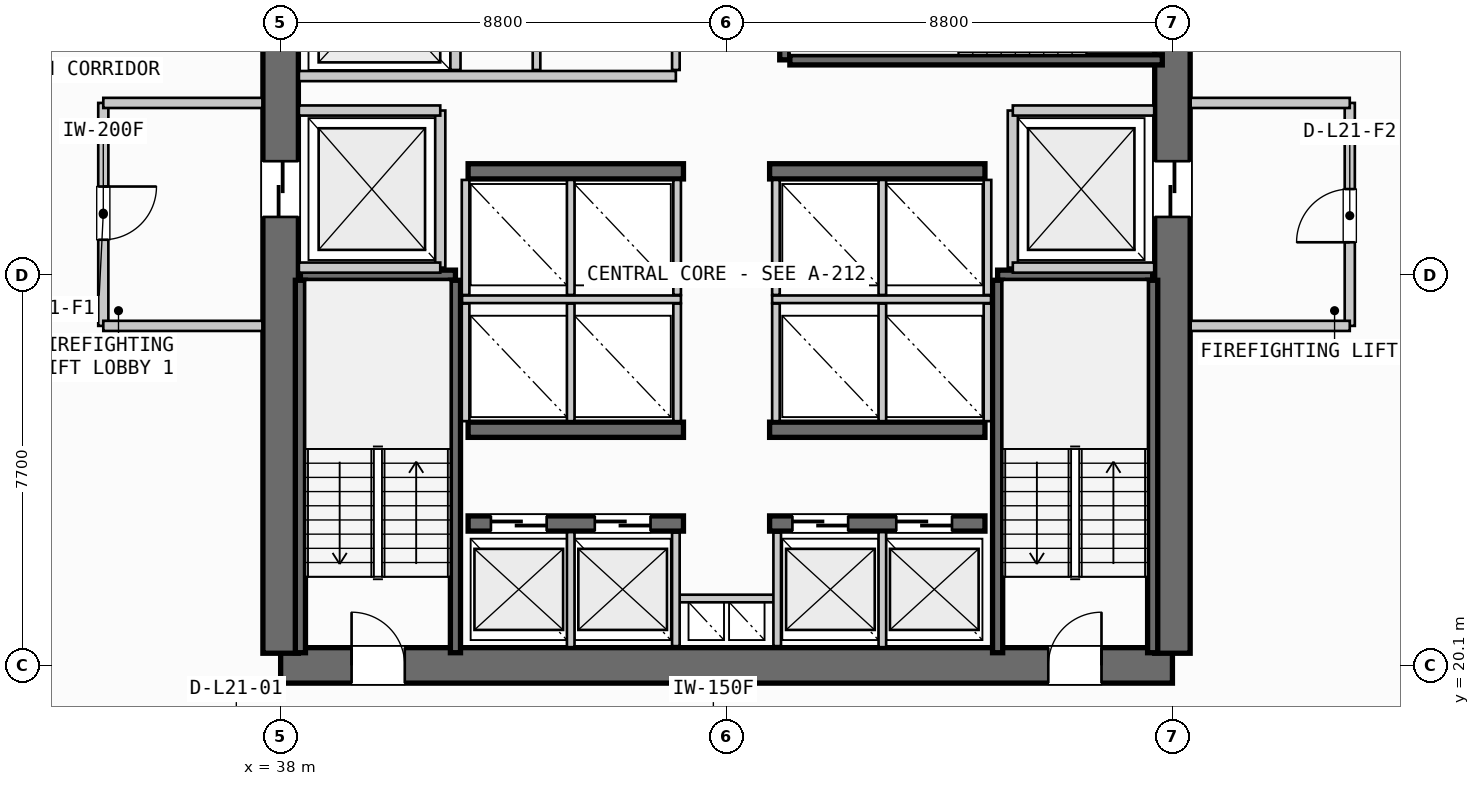
"""IFC4 building model, lengths in metres.
Left out: names, types, materials, properties, quantities, classifications, styles, units other than length and angle.
Written with IfcOpenShell. Run it as: python <this file> out.ifc"""

import sys

from ifc_helpers import new_model, si_unit, direction, frame, frame_2d, origin, place, context, subcontext, project, spatial, rectangle, extrude, source, transform, mapped, element, fill, save


model = new_model("IFC4")
c1 = context("Model", 3, precision=1e-05, world=origin(), true_north=direction((0.0, 1.0)))
c2 = subcontext(c1, "Body", "Model", "MODEL_VIEW")
j1 = project(units=[si_unit("LENGTHUNIT", "METRE"), si_unit("PLANEANGLEUNIT", "RADIAN")], contexts=[c1])
p1 = place(None, origin())
s1 = spatial("IfcSite", under=j1, at=p1, CompositionType="ELEMENT")
p2 = place(p1, origin())
s2 = spatial("IfcBuilding", under=s1, at=p2, CompositionType="ELEMENT")
p3 = place(p2, frame((0.0, 0.0, 89.2)))
s3 = spatial("IfcBuildingStorey", under=s2, at=p3, CompositionType="ELEMENT", Elevation=89.2)
p4 = place(p3, frame((38.0, 20.1, 0.0), z_axis=(0.0, 0.0, 1.0), x_axis=(1.0, 0.0, 0.0)))
e1 = element("IfcWall", 1, at=p4, inside=s3, PredefinedType="SHEAR", context=c2, shape_type="SweptSolid", body=[
    extrude(rectangle(XDim=17.6, YDim=0.7, at=frame_2d((8.8, 0.0))), origin(), (0.0, 0.0, 1.0), 3.35),
])
p5 = place(p4, frame((1.4, 0.0, 0.0)))
e2 = element("IfcOpeningElement", 2, at=p5, cuts=e1, PredefinedType="OPENING", context=c2, shape_type="SweptSolid", body=[
    extrude(rectangle(XDim=1.05, YDim=2.15, at=frame_2d((0.525, 1.075))), frame((0.0, 0.36, 0.0), z_axis=(0.0, -1.0, 0.0), x_axis=(1.0, 0.0, 0.0)), (0.0, 0.0, 1.0), 0.72),
])
p6 = place(p4, frame((15.15, 0.0, 0.0)))
e3 = element("IfcOpeningElement", 3, at=p6, cuts=e1, PredefinedType="OPENING", context=c2, shape_type="SweptSolid", body=[
    extrude(rectangle(XDim=1.05, YDim=2.15, at=frame_2d((0.525, 1.075))), frame((0.0, 0.36, 0.0), z_axis=(0.0, -1.0, 0.0), x_axis=(1.0, 0.0, 0.0)), (0.0, 0.0, 1.0), 0.72),
])
p7 = place(p3, frame((38.0, 35.26, 0.0), z_axis=(0.0, 0.0, 1.0), x_axis=(0.0, -1.0, 0.0)))
e4 = element("IfcWall", 4, at=p7, inside=s3, PredefinedType="SHEAR", context=c2, shape_type="SweptSolid", body=[
    extrude(rectangle(XDim=14.92, YDim=0.7, at=frame_2d((7.46, 0.0))), origin(), (0.0, 0.0, 1.0), 3.35),
])
p8 = place(p7, frame((5.21, 0.0, 0.0)))
e5 = element("IfcOpeningElement", 5, at=p8, cuts=e4, PredefinedType="OPENING", context=c2, shape_type="SweptSolid", body=[
    extrude(rectangle(XDim=1.1, YDim=2.2, at=frame_2d((0.55, 1.1))), frame((0.0, 0.36, 0.0), z_axis=(0.0, -1.0, 0.0), x_axis=(1.0, 0.0, 0.0)), (0.0, 0.0, 1.0), 0.72),
])
p9 = place(p3, frame((55.6, 20.34, 0.0), z_axis=(0.0, 0.0, 1.0), x_axis=(0.0, 1.0, 0.0)))
e6 = element("IfcWall", 6, at=p9, inside=s3, PredefinedType="SHEAR", context=c2, shape_type="SweptSolid", body=[
    extrude(rectangle(XDim=14.92, YDim=0.7, at=frame_2d((7.46, 0.0))), origin(), (0.0, 0.0, 1.0), 3.35),
])
p10 = place(p9, frame((12.71, 0.0, 0.0)))
e7 = element("IfcOpeningElement", 7, at=p10, cuts=e6, PredefinedType="OPENING", context=c2, shape_type="SweptSolid", body=[
    extrude(rectangle(XDim=1.05, YDim=2.15, at=frame_2d((0.525, 1.075))), frame((0.0, 0.36, 0.0), z_axis=(0.0, -1.0, 0.0), x_axis=(1.0, 0.0, 0.0)), (0.0, 0.0, 1.0), 0.72),
])
p11 = place(p9, frame((8.61, 0.0, 0.0)))
e8 = element("IfcOpeningElement", 8, at=p11, cuts=e6, PredefinedType="OPENING", context=c2, shape_type="SweptSolid", body=[
    extrude(rectangle(XDim=1.1, YDim=2.2, at=frame_2d((0.55, 1.1))), frame((0.0, 0.36, 0.0), z_axis=(0.0, -1.0, 0.0), x_axis=(1.0, 0.0, 0.0)), (0.0, 0.0, 1.0), 0.72),
])
p12 = place(p3, frame((41.7, 22.9, 0.0), z_axis=(0.0, 0.0, 1.0), x_axis=(1.0, 0.0, 0.0)))
e9 = element("IfcWall", 9, at=p12, inside=s3, PredefinedType="SHEAR", context=c2, shape_type="SweptSolid", body=[
    extrude(rectangle(XDim=4.25, YDim=0.3, at=frame_2d((2.125, 0.0))), origin(), (0.0, 0.0, 1.0), 3.35),
])
p13 = place(p12, frame((0.45, 0.0, 0.0)))
e10 = element("IfcOpeningElement", 10, at=p13, cuts=e9, PredefinedType="OPENING", context=c2, shape_type="SweptSolid", body=[
    extrude(rectangle(XDim=1.1, YDim=2.2, at=frame_2d((0.55, 1.1))), frame((0.0, 0.16, 0.0), z_axis=(0.0, -1.0, 0.0), x_axis=(1.0, 0.0, 0.0)), (0.0, 0.0, 1.0), 0.32),
])
p14 = place(p12, frame((2.5, 0.0, 0.0)))
e11 = element("IfcOpeningElement", 11, at=p14, cuts=e9, PredefinedType="OPENING", context=c2, shape_type="SweptSolid", body=[
    extrude(rectangle(XDim=1.1, YDim=2.2, at=frame_2d((0.55, 1.1))), frame((0.0, 0.16, 0.0), z_axis=(0.0, -1.0, 0.0), x_axis=(1.0, 0.0, 0.0)), (0.0, 0.0, 1.0), 0.32),
])
p15 = place(p3, frame((47.65, 22.9, 0.0), z_axis=(0.0, 0.0, 1.0), x_axis=(1.0, 0.0, 0.0)))
e12 = element("IfcWall", 12, at=p15, inside=s3, PredefinedType="SHEAR", context=c2, shape_type="SweptSolid", body=[
    extrude(rectangle(XDim=4.25, YDim=0.3, at=frame_2d((2.125, 0.0))), origin(), (0.0, 0.0, 1.0), 3.35),
])
p16 = place(p15, frame((0.45, 0.0, 0.0)))
e13 = element("IfcOpeningElement", 13, at=p16, cuts=e12, PredefinedType="OPENING", context=c2, shape_type="SweptSolid", body=[
    extrude(rectangle(XDim=1.1, YDim=2.2, at=frame_2d((0.55, 1.1))), frame((0.0, 0.16, 0.0), z_axis=(0.0, -1.0, 0.0), x_axis=(1.0, 0.0, 0.0)), (0.0, 0.0, 1.0), 0.32),
])
p17 = place(p15, frame((2.5, 0.0, 0.0)))
e14 = element("IfcOpeningElement", 14, at=p17, cuts=e12, PredefinedType="OPENING", context=c2, shape_type="SweptSolid", body=[
    extrude(rectangle(XDim=1.1, YDim=2.2, at=frame_2d((0.55, 1.1))), frame((0.0, 0.16, 0.0), z_axis=(0.0, -1.0, 0.0), x_axis=(1.0, 0.0, 0.0)), (0.0, 0.0, 1.0), 0.32),
])
for number, where, z_axis, x_axis in (
    (15, (41.7, 24.75, 0.0), (0.0, 0.0, 1.0), (1.0, 0.0, 0.0)),
    (16, (47.65, 24.75, 0.0), (0.0, 0.0, 1.0), (1.0, 0.0, 0.0)),
    (17, (41.7, 29.85, 0.0), (0.0, 0.0, 1.0), (1.0, 0.0, 0.0)),
    (18, (47.65, 29.85, 0.0), (0.0, 0.0, 1.0), (1.0, 0.0, 0.0)),
):
    element("IfcWall", number, at=place(p3, frame(where, z_axis=z_axis, x_axis=x_axis)), inside=s3, PredefinedType="SHEAR", context=c2, shape_type="SweptSolid", body=[
        extrude(rectangle(XDim=4.25, YDim=0.3, at=frame_2d((2.125, 0.0))), origin(), (0.0, 0.0, 1.0), 3.35),
    ])
p18 = place(p3, frame((38.39, 27.8, 0.0), z_axis=(0.0, 0.0, 1.0), x_axis=(1.0, 0.0, 0.0)))
e19 = element("IfcWall", 19, at=p18, inside=s3, PredefinedType="SHEAR", context=c2, shape_type="SweptSolid", body=[
    extrude(rectangle(XDim=3.06, YDim=0.2, at=frame_2d((1.53, 0.0))), origin(), (0.0, 0.0, 1.0), 3.35),
])
for number, where, z_axis, x_axis in (
    (20, (41.45, 27.7, 0.0), (0.0, 0.0, 1.0), (0.0, -1.0, 0.0)),
    (21, (38.39, 20.35, 0.0), (0.0, 0.0, 1.0), (0.0, 1.0, 0.0)),
):
    element("IfcWall", number, at=place(p3, frame(where, z_axis=z_axis, x_axis=x_axis)), inside=s3, PredefinedType="SHEAR", context=c2, shape_type="SweptSolid", body=[
        extrude(rectangle(XDim=7.35, YDim=0.2, at=frame_2d((3.675, 0.0))), origin(), (0.0, 0.0, 1.0), 3.35),
    ])
p19 = place(p3, frame((52.15, 27.8, 0.0), z_axis=(0.0, 0.0, 1.0), x_axis=(1.0, 0.0, 0.0)))
e22 = element("IfcWall", 22, at=p19, inside=s3, PredefinedType="SHEAR", context=c2, shape_type="SweptSolid", body=[
    extrude(rectangle(XDim=3.06, YDim=0.2, at=frame_2d((1.53, 0.0))), origin(), (0.0, 0.0, 1.0), 3.35),
])
for number, where, z_axis, x_axis in (
    (23, (55.21, 27.7, 0.0), (0.0, 0.0, 1.0), (0.0, -1.0, 0.0)),
    (24, (52.15, 20.35, 0.0), (0.0, 0.0, 1.0), (0.0, 1.0, 0.0)),
):
    element("IfcWall", number, at=place(p3, frame(where, z_axis=z_axis, x_axis=x_axis)), inside=s3, PredefinedType="SHEAR", context=c2, shape_type="SweptSolid", body=[
        extrude(rectangle(XDim=7.35, YDim=0.2, at=frame_2d((3.675, 0.0))), origin(), (0.0, 0.0, 1.0), 3.35),
    ])
p20 = place(p3, frame((47.95, 32.05, 0.0), z_axis=(0.0, 0.0, 1.0), x_axis=(0.0, 1.0, 0.0)))
e25 = element("IfcWall", 25, at=p20, inside=s3, PredefinedType="SHEAR", context=c2, shape_type="SweptSolid", body=[
    extrude(rectangle(XDim=3.06, YDim=0.2, at=frame_2d((1.53, 0.0))), origin(), (0.0, 0.0, 1.0), 3.35),
])
p21 = place(p3, frame((55.4, 32.05, 0.0), z_axis=(0.0, 0.0, 1.0), x_axis=(-1.0, 0.0, 0.0)))
e26 = element("IfcWall", 26, at=p21, inside=s3, PredefinedType="SHEAR", context=c2, shape_type="SweptSolid", body=[
    extrude(rectangle(XDim=7.35, YDim=0.2, at=frame_2d((3.675, 0.0))), origin(), (0.0, 0.0, 1.0), 3.35),
])
p22 = place(p3, frame((45.8, 21.42, 0.0), z_axis=(0.0, 0.0, 1.0), x_axis=(1.0, 0.0, 0.0)))
e27 = element("IfcWall", 27, at=p22, inside=s3, PredefinedType="PARTITIONING", context=c2, shape_type="SweptSolid", body=[
    extrude(rectangle(XDim=2.0, YDim=0.15, at=frame_2d((1.0, 0.0))), origin(), (0.0, 0.0, 1.0), 2.28),
])
for number, where, z_axis, x_axis in (
    (28, (45.8, 20.48, 0.0), (0.0, 0.0, 1.0), (0.0, 1.0, 0.0)),
    (29, (47.8, 20.48, 0.0), (0.0, 0.0, 1.0), (0.0, 1.0, 0.0)),
):
    element("IfcWall", number, at=place(p3, frame(where, z_axis=z_axis, x_axis=x_axis)), inside=s3, PredefinedType="PARTITIONING", context=c2, shape_type="SweptSolid", body=[
        extrude(rectangle(XDim=2.24, YDim=0.15, at=frame_2d((1.12, 0.0))), origin(), (0.0, 0.0, 1.0), 2.28),
    ])
p23 = place(p3, frame((41.15, 27.95, 0.0), z_axis=(0.0, 0.0, 1.0), x_axis=(0.0, 1.0, 0.0)))
e30 = element("IfcWall", 30, at=p23, inside=s3, PredefinedType="PARTITIONING", context=c2, shape_type="SweptSolid", body=[
    extrude(rectangle(XDim=3.1, YDim=0.2, at=frame_2d((1.55, 0.0))), origin(), (0.0, 0.0, 1.0), 2.28),
])
for number, where, z_axis, x_axis in (
    (31, (38.36, 27.95, 0.0), (0.0, 0.0, 1.0), (1.0, 0.0, 0.0)),
    (32, (38.36, 31.05, 0.0), (0.0, 0.0, 1.0), (1.0, 0.0, 0.0)),
):
    element("IfcWall", number, at=place(p3, frame(where, z_axis=z_axis, x_axis=x_axis)), inside=s3, PredefinedType="PARTITIONING", context=c2, shape_type="SweptSolid", body=[
        extrude(rectangle(XDim=2.79, YDim=0.2, at=frame_2d((1.395, 0.0))), origin(), (0.0, 0.0, 1.0), 2.28),
    ])
p24 = place(p3, frame((34.5, 31.2, 0.0), z_axis=(0.0, 0.0, 1.0), x_axis=(0.0, -1.0, 0.0)))
e33 = element("IfcWall", 33, at=p24, inside=s3, PredefinedType="PARTITIONING", context=c2, shape_type="SweptSolid", body=[
    extrude(rectangle(XDim=4.4, YDim=0.2, at=frame_2d((2.2, 0.0))), origin(), (0.0, 0.0, 1.0), 2.28),
])
p25 = place(p24, frame((1.65, 0.0, 0.0)))
e34 = element("IfcOpeningElement", 34, at=p25, cuts=e33, PredefinedType="OPENING", context=c2, shape_type="SweptSolid", body=[
    extrude(rectangle(XDim=1.05, YDim=2.15, at=frame_2d((0.525, 1.075))), frame((0.0, 0.11, 0.0), z_axis=(0.0, -1.0, 0.0), x_axis=(1.0, 0.0, 0.0)), (0.0, 0.0, 1.0), 0.22),
])
for number, where, z_axis, x_axis in (
    (35, (34.5, 26.8, 0.0), (0.0, 0.0, 1.0), (1.0, 0.0, 0.0)),
    (36, (34.5, 31.2, 0.0), (0.0, 0.0, 1.0), (1.0, 0.0, 0.0)),
):
    element("IfcWall", number, at=place(p3, frame(where, z_axis=z_axis, x_axis=x_axis)), inside=s3, PredefinedType="PARTITIONING", context=c2, shape_type="SweptSolid", body=[
        extrude(rectangle(XDim=3.14, YDim=0.2, at=frame_2d((1.57, 0.0))), origin(), (0.0, 0.0, 1.0), 2.28),
    ])
p26 = place(p3, frame((52.45, 27.95, 0.0), z_axis=(0.0, 0.0, 1.0), x_axis=(0.0, 1.0, 0.0)))
e37 = element("IfcWall", 37, at=p26, inside=s3, PredefinedType="PARTITIONING", context=c2, shape_type="SweptSolid", body=[
    extrude(rectangle(XDim=3.1, YDim=0.2, at=frame_2d((1.55, 0.0))), origin(), (0.0, 0.0, 1.0), 2.28),
])
for number, where, z_axis, x_axis in (
    (38, (52.45, 27.95, 0.0), (0.0, 0.0, 1.0), (1.0, 0.0, 0.0)),
    (39, (52.45, 31.05, 0.0), (0.0, 0.0, 1.0), (1.0, 0.0, 0.0)),
):
    element("IfcWall", number, at=place(p3, frame(where, z_axis=z_axis, x_axis=x_axis)), inside=s3, PredefinedType="PARTITIONING", context=c2, shape_type="SweptSolid", body=[
        extrude(rectangle(XDim=2.79, YDim=0.2, at=frame_2d((1.395, 0.0))), origin(), (0.0, 0.0, 1.0), 2.28),
    ])
p27 = place(p3, frame((59.1, 26.8, 0.0), z_axis=(0.0, 0.0, 1.0), x_axis=(0.0, 1.0, 0.0)))
e40 = element("IfcWall", 40, at=p27, inside=s3, PredefinedType="PARTITIONING", context=c2, shape_type="SweptSolid", body=[
    extrude(rectangle(XDim=4.4, YDim=0.2, at=frame_2d((2.2, 0.0))), origin(), (0.0, 0.0, 1.0), 2.28),
])
p28 = place(p27, frame((1.65, 0.0, 0.0)))
e41 = element("IfcOpeningElement", 41, at=p28, cuts=e40, PredefinedType="OPENING", context=c2, shape_type="SweptSolid", body=[
    extrude(rectangle(XDim=1.05, YDim=2.15, at=frame_2d((0.525, 1.075))), frame((0.0, 0.11, 0.0), z_axis=(0.0, -1.0, 0.0), x_axis=(1.0, 0.0, 0.0)), (0.0, 0.0, 1.0), 0.22),
])
for number, where, z_axis, x_axis in (
    (42, (55.96, 26.8, 0.0), (0.0, 0.0, 1.0), (1.0, 0.0, 0.0)),
    (43, (55.96, 31.2, 0.0), (0.0, 0.0, 1.0), (1.0, 0.0, 0.0)),
):
    element("IfcWall", number, at=place(p3, frame(where, z_axis=z_axis, x_axis=x_axis)), inside=s3, PredefinedType="PARTITIONING", context=c2, shape_type="SweptSolid", body=[
        extrude(rectangle(XDim=3.14, YDim=0.2, at=frame_2d((1.57, 0.0))), origin(), (0.0, 0.0, 1.0), 2.28),
    ])
for number, where, z_axis, x_axis in (
    (44, (43.725, 20.46, 0.0), (0.0, 0.0, 1.0), (0.0, 1.0, 0.0)),
    (45, (49.875, 20.46, 0.0), (0.0, 0.0, 1.0), (0.0, 1.0, 0.0)),
):
    element("IfcWall", number, at=place(p3, frame(where, z_axis=z_axis, x_axis=x_axis)), inside=s3, PredefinedType="PARTITIONING", context=c2, shape_type="SweptSolid", body=[
        extrude(rectangle(XDim=2.27, YDim=0.15, at=frame_2d((1.135, 0.0))), origin(), (0.0, 0.0, 1.0), 2.28),
    ])
p29 = place(p3, frame((41.58, 27.325, 0.0), z_axis=(0.0, 0.0, 1.0), x_axis=(1.0, 0.0, 0.0)))
e46 = element("IfcWall", 46, at=p29, inside=s3, PredefinedType="PARTITIONING", context=c2, shape_type="SweptSolid", body=[
    extrude(rectangle(XDim=4.32, YDim=0.15, at=frame_2d((2.16, 0.0))), origin(), (0.0, 0.0, 1.0), 2.28),
])
p30 = place(p3, frame((47.7, 27.325, 0.0), z_axis=(0.0, 0.0, 1.0), x_axis=(1.0, 0.0, 0.0)))
e47 = element("IfcWall", 47, at=p30, inside=s3, PredefinedType="PARTITIONING", context=c2, shape_type="SweptSolid", body=[
    extrude(rectangle(XDim=4.32, YDim=0.15, at=frame_2d((2.16, 0.0))), origin(), (0.0, 0.0, 1.0), 2.28),
])
for number, where, z_axis, x_axis in (
    (48, (41.65, 24.92, 0.0), (0.0, 0.0, 1.0), (0.0, 1.0, 0.0)),
    (49, (43.725, 24.92, 0.0), (0.0, 0.0, 1.0), (0.0, 1.0, 0.0)),
    (50, (45.825, 24.92, 0.0), (0.0, 0.0, 1.0), (0.0, 1.0, 0.0)),
    (51, (47.775, 24.92, 0.0), (0.0, 0.0, 1.0), (0.0, 1.0, 0.0)),
    (52, (49.875, 24.92, 0.0), (0.0, 0.0, 1.0), (0.0, 1.0, 0.0)),
    (53, (51.95, 24.92, 0.0), (0.0, 0.0, 1.0), (0.0, 1.0, 0.0)),
):
    element("IfcWall", number, at=place(p3, frame(where, z_axis=z_axis, x_axis=x_axis)), inside=s3, PredefinedType="PARTITIONING", context=c2, shape_type="SweptSolid", body=[
        extrude(rectangle(XDim=2.32, YDim=0.15, at=frame_2d((1.16, 0.0))), origin(), (0.0, 0.0, 1.0), 2.28),
    ])
for number, where, z_axis, x_axis in (
    (54, (41.65, 27.41, 0.0), (0.0, 0.0, 1.0), (0.0, 1.0, 0.0)),
    (55, (43.725, 27.41, 0.0), (0.0, 0.0, 1.0), (0.0, 1.0, 0.0)),
    (56, (45.825, 27.41, 0.0), (0.0, 0.0, 1.0), (0.0, 1.0, 0.0)),
    (57, (47.775, 27.41, 0.0), (0.0, 0.0, 1.0), (0.0, 1.0, 0.0)),
    (58, (49.875, 27.41, 0.0), (0.0, 0.0, 1.0), (0.0, 1.0, 0.0)),
    (59, (51.95, 27.41, 0.0), (0.0, 0.0, 1.0), (0.0, 1.0, 0.0)),
):
    element("IfcWall", number, at=place(p3, frame(where, z_axis=z_axis, x_axis=x_axis)), inside=s3, PredefinedType="PARTITIONING", context=c2, shape_type="SweptSolid", body=[
        extrude(rectangle(XDim=2.27, YDim=0.15, at=frame_2d((1.135, 0.0))), origin(), (0.0, 0.0, 1.0), 2.28),
    ])
p31 = place(p3, frame((41.45, 31.85, 0.0), z_axis=(0.0, 0.0, 1.0), x_axis=(0.0, 1.0, 0.0)))
e60 = element("IfcWall", 60, at=p31, inside=s3, PredefinedType="PARTITIONING", context=c2, shape_type="SweptSolid", body=[
    extrude(rectangle(XDim=3.29, YDim=0.2, at=frame_2d((1.645, 0.0))), origin(), (0.0, 0.0, 1.0), 2.28),
])
p32 = place(p3, frame((38.36, 31.73, 0.0), z_axis=(0.0, 0.0, 1.0), x_axis=(1.0, 0.0, 0.0)))
e61 = element("IfcWall", 61, at=p32, inside=s3, PredefinedType="PARTITIONING", context=c2, shape_type="SweptSolid", body=[
    extrude(rectangle(XDim=7.44, YDim=0.2, at=frame_2d((3.72, 0.0))), origin(), (0.0, 0.0, 1.0), 2.28),
])
p33 = place(p3, frame((45.8, 31.85, 0.0), z_axis=(0.0, 0.0, 1.0), x_axis=(0.0, 1.0, 0.0)))
e62 = element("IfcWall", 62, at=p33, inside=s3, PredefinedType="PARTITIONING", context=c2, shape_type="SweptSolid", body=[
    extrude(rectangle(XDim=3.29, YDim=0.15, at=frame_2d((1.645, 0.0))), origin(), (0.0, 0.0, 1.0), 2.28),
])
p34 = place(p3, frame((43.05, 31.85, 0.0), z_axis=(0.0, 0.0, 1.0), x_axis=(0.0, 1.0, 0.0)))
e63 = element("IfcWall", 63, at=p34, inside=s3, PredefinedType="PLUMBINGWALL", context=c2, shape_type="SweptSolid", body=[
    extrude(rectangle(XDim=3.29, YDim=0.15, at=frame_2d((1.645, 0.0))), origin(), (0.0, 0.0, 1.0), 2.28),
])
m1 = source(origin(), c2, "Body", "SweptSolid", [
    extrude(rectangle(XDim=1.05, YDim=2.15, at=frame_2d((0.525, 1.075))), frame((0.0, 0.025, 0.0), z_axis=(0.0, -1.0, 0.0), x_axis=(1.0, 0.0, 0.0)), (0.0, 0.0, 1.0), 0.05),
])
p35 = place(p5, origin())
e64 = element("IfcDoor", 64, at=p35, inside=s3, OperationType="SINGLE_SWING_LEFT", PredefinedType="DOOR", context=c2, shape_type="MappedRepresentation", body=[
    mapped(m1, transform((0.0, 0.0, 0.0), scale=1.0)),
])
fill(e2, e64)
p36 = place(p6, origin())
e65 = element("IfcDoor", 65, at=p36, inside=s3, OperationType="SINGLE_SWING_RIGHT", PredefinedType="DOOR", context=c2, shape_type="MappedRepresentation", body=[
    mapped(m1, transform((0.0, 0.0, 0.0), scale=1.0)),
])
fill(e3, e65)
m2 = source(origin(), c2, "Body", "SweptSolid", [
    extrude(rectangle(XDim=1.1, YDim=2.2, at=frame_2d((0.55, 1.1))), frame((0.0, 0.025, 0.0), z_axis=(0.0, -1.0, 0.0), x_axis=(1.0, 0.0, 0.0)), (0.0, 0.0, 1.0), 0.05),
])
p37 = place(p8, origin())
e66 = element("IfcDoor", 66, at=p37, inside=s3, OperationType="SLIDING_TO_LEFT", PredefinedType="DOOR", context=c2, shape_type="MappedRepresentation", body=[
    mapped(m2, transform((0.0, 0.0, 0.0), scale=1.0)),
])
fill(e5, e66)
p38 = place(p11, origin())
e67 = element("IfcDoor", 67, at=p38, inside=s3, OperationType="SLIDING_TO_RIGHT", PredefinedType="DOOR", context=c2, shape_type="MappedRepresentation", body=[
    mapped(m2, transform((0.0, 0.0, 0.0), scale=1.0)),
])
fill(e8, e67)
p39 = place(p13, origin())
e68 = element("IfcDoor", 68, at=p39, inside=s3, OperationType="SLIDING_TO_LEFT", PredefinedType="DOOR", context=c2, shape_type="MappedRepresentation", body=[
    mapped(m2, transform((0.0, 0.0, 0.0), scale=1.0)),
])
fill(e10, e68)
p40 = place(p14, origin())
e69 = element("IfcDoor", 69, at=p40, inside=s3, OperationType="SLIDING_TO_LEFT", PredefinedType="DOOR", context=c2, shape_type="MappedRepresentation", body=[
    mapped(m2, transform((0.0, 0.0, 0.0), scale=1.0)),
])
fill(e11, e69)
p41 = place(p16, origin())
e70 = element("IfcDoor", 70, at=p41, inside=s3, OperationType="SLIDING_TO_LEFT", PredefinedType="DOOR", context=c2, shape_type="MappedRepresentation", body=[
    mapped(m2, transform((0.0, 0.0, 0.0), scale=1.0)),
])
fill(e13, e70)
p42 = place(p17, origin())
e71 = element("IfcDoor", 71, at=p42, inside=s3, OperationType="SLIDING_TO_LEFT", PredefinedType="DOOR", context=c2, shape_type="MappedRepresentation", body=[
    mapped(m2, transform((0.0, 0.0, 0.0), scale=1.0)),
])
fill(e14, e71)
p43 = place(p25, origin())
e72 = element("IfcDoor", 72, at=p43, inside=s3, OperationType="SINGLE_SWING_LEFT", PredefinedType="DOOR", context=c2, shape_type="MappedRepresentation", body=[
    mapped(m1, transform((0.0, 0.0, 0.0), scale=1.0)),
])
fill(e34, e72)
p44 = place(p28, origin())
e73 = element("IfcDoor", 73, at=p44, inside=s3, OperationType="SINGLE_SWING_LEFT", PredefinedType="DOOR", context=c2, shape_type="MappedRepresentation", body=[
    mapped(m1, transform((0.0, 0.0, 0.0), scale=1.0)),
])
fill(e41, e73)
save(model, sys.argv[1])
